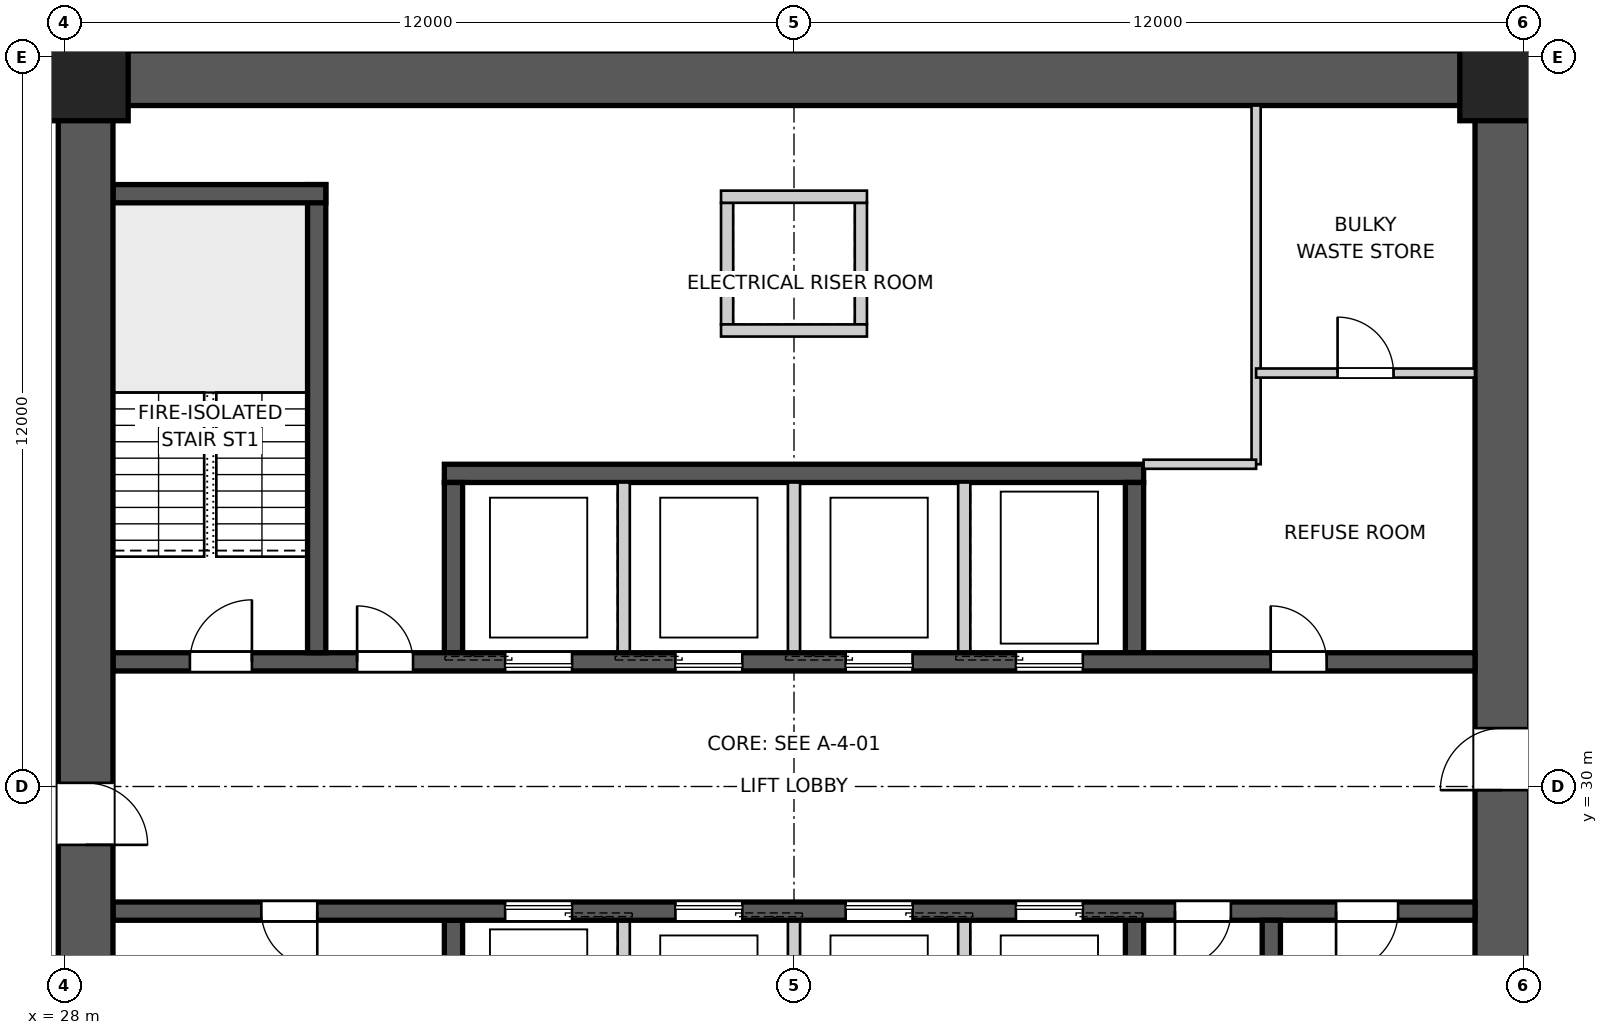
"""IFC4 building model, lengths in metres.
Left out: names, types, materials, properties, quantities, classifications, styles, units other than length and angle.
Written with IfcOpenShell. Run it as: python <this file> out.ifc"""

import sys

from ifc_helpers import new_model, si_unit, direction, frame, frame_2d, origin, origin_2d, place, context, subcontext, project, spatial, polyline, rectangle, outline, extrude, element, fill, save


model = new_model("IFC4")
c1 = context("Model", 3, precision=1e-05, world=origin(), true_north=direction((0.0, 1.0)))
c2 = subcontext(c1, "Body", "Model", "MODEL_VIEW")
j1 = project(units=[si_unit("LENGTHUNIT", "METRE"), si_unit("PLANEANGLEUNIT", "RADIAN")], contexts=[c1])
p1 = place(None, origin())
s1 = spatial("IfcSite", under=j1, at=p1, CompositionType="ELEMENT")
p2 = place(p1, origin())
s2 = spatial("IfcBuilding", under=s1, at=p2, CompositionType="ELEMENT")
p3 = place(p2, frame((0.0, 0.0, -3.7)))
s3 = spatial("IfcBuildingStorey", under=s2, at=p3, CompositionType="ELEMENT", Elevation=-3.7)
p4 = place(p3, frame((28.8, 41.65, 0.0), z_axis=(0.0, 0.0, 1.0), x_axis=(1.0, 0.0, 0.0)))
e1 = element("IfcWall", 1, at=p4, inside=s3, PredefinedType="SHEAR", context=c2, shape_type="SweptSolid", body=[
    extrude(outline(polyline([(0.0, -0.45), (22.4, -0.45), (22.4, -0.025), (22.85, -0.025), (22.85, 0.025), (22.4, 0.025), (22.4, 0.45), (0.0, 0.45), (0.0, 0.025), (-0.45, 0.025), (-0.45, -0.025), (0.0, -0.025), (0.0, -0.45)])), origin(), (0.0, 0.0, 1.0), 3.7),
])
p5 = place(p3, frame((51.65, 18.8, 0.0), z_axis=(0.0, 0.0, 1.0), x_axis=(0.0, 1.0, 0.0)))
e2 = element("IfcWall", 2, at=p5, inside=s3, PredefinedType="SHEAR", context=c2, shape_type="SweptSolid", body=[
    extrude(outline(polyline([(0.0, -0.45), (22.4, -0.45), (22.4, -0.025), (22.85, -0.025), (22.85, 0.025), (22.4, 0.025), (22.4, 0.45), (0.0, 0.45), (0.0, 0.025), (-0.45, 0.025), (-0.45, -0.025), (0.0, -0.025), (0.0, -0.45)])), origin(), (0.0, 0.0, 1.0), 3.7),
])
p6 = place(p5, frame((11.14, 0.0, 0.0)))
e3 = element("IfcOpeningElement", 3, at=p6, cuts=e2, PredefinedType="OPENING", context=c2, shape_type="SweptSolid", body=[
    extrude(rectangle(XDim=1.02, YDim=2.4, at=frame_2d((0.51, 1.2))), frame((0.0, 0.46, 0.0), z_axis=(0.0, -1.0, 0.0), x_axis=(1.0, 0.0, 0.0)), (0.0, 0.0, 1.0), 0.92),
])
p7 = place(p3, frame((28.35, 41.2, 0.0), z_axis=(0.0, 0.0, 1.0), x_axis=(0.0, -1.0, 0.0)))
e4 = element("IfcWall", 4, at=p7, inside=s3, PredefinedType="SHEAR", context=c2, shape_type="SweptSolid", body=[
    extrude(outline(polyline([(0.0, -0.45), (22.4, -0.45), (22.4, -0.025), (22.85, -0.025), (22.85, 0.025), (22.4, 0.025), (22.4, 0.45), (0.0, 0.45), (0.0, 0.025), (-0.45, 0.025), (-0.45, -0.025), (0.0, -0.025), (0.0, -0.45)])), origin(), (0.0, 0.0, 1.0), 3.7),
])
p8 = place(p7, frame((11.14, 0.0, 0.0)))
e5 = element("IfcOpeningElement", 5, at=p8, cuts=e4, PredefinedType="OPENING", context=c2, shape_type="SweptSolid", body=[
    extrude(rectangle(XDim=1.02, YDim=2.4, at=frame_2d((0.51, 1.2))), frame((0.0, 0.46, 0.0), z_axis=(0.0, -1.0, 0.0), x_axis=(1.0, 0.0, 0.0)), (0.0, 0.0, 1.0), 0.92),
])
p9 = place(p3, frame((28.8, 32.05, 0.0), z_axis=(0.0, 0.0, 1.0), x_axis=(1.0, 0.0, 0.0)))
e6 = element("IfcWall", 6, at=p9, inside=s3, PredefinedType="SHEAR", context=c2, shape_type="SweptSolid", body=[
    extrude(rectangle(XDim=22.4, YDim=0.3, at=frame_2d((11.2, 0.0))), origin(), (0.0, 0.0, 1.0), 3.7),
])
p10 = place(p9, frame((19.04, 0.0, 0.0)))
e7 = element("IfcOpeningElement", 7, at=p10, cuts=e6, PredefinedType="OPENING", context=c2, shape_type="SweptSolid", body=[
    extrude(rectangle(XDim=0.92, YDim=2.1, at=frame_2d((0.46, 1.05))), frame((0.0, 0.16, 0.0), z_axis=(0.0, -1.0, 0.0), x_axis=(1.0, 0.0, 0.0)), (0.0, 0.0, 1.0), 0.32),
])
p11 = place(p9, frame((1.265, 0.0, 0.0)))
e8 = element("IfcOpeningElement", 8, at=p11, cuts=e6, PredefinedType="OPENING", context=c2, shape_type="SweptSolid", body=[
    extrude(rectangle(XDim=1.02, YDim=2.1, at=frame_2d((0.51, 1.05))), frame((0.0, 0.16, 0.0), z_axis=(0.0, -1.0, 0.0), x_axis=(1.0, 0.0, 0.0)), (0.0, 0.0, 1.0), 0.32),
])
p12 = place(p9, frame((4.015, 0.0, 0.0)))
e9 = element("IfcOpeningElement", 9, at=p12, cuts=e6, PredefinedType="OPENING", context=c2, shape_type="SweptSolid", body=[
    extrude(rectangle(XDim=0.92, YDim=2.1, at=frame_2d((0.46, 1.05))), frame((0.0, 0.16, 0.0), z_axis=(0.0, -1.0, 0.0), x_axis=(1.0, 0.0, 0.0)), (0.0, 0.0, 1.0), 0.32),
])
p13 = place(p9, frame((6.45, 0.0, 0.0)))
e10 = element("IfcOpeningElement", 10, at=p13, cuts=e6, PredefinedType="OPENING", context=c2, shape_type="SweptSolid", body=[
    extrude(rectangle(XDim=1.1, YDim=2.1, at=frame_2d((0.55, 1.05))), frame((0.0, 0.16, 0.0), z_axis=(0.0, -1.0, 0.0), x_axis=(1.0, 0.0, 0.0)), (0.0, 0.0, 1.0), 0.32),
])
p14 = place(p9, frame((9.25, 0.0, 0.0)))
e11 = element("IfcOpeningElement", 11, at=p14, cuts=e6, PredefinedType="OPENING", context=c2, shape_type="SweptSolid", body=[
    extrude(rectangle(XDim=1.1, YDim=2.1, at=frame_2d((0.55, 1.05))), frame((0.0, 0.16, 0.0), z_axis=(0.0, -1.0, 0.0), x_axis=(1.0, 0.0, 0.0)), (0.0, 0.0, 1.0), 0.32),
])
p15 = place(p9, frame((12.05, 0.0, 0.0)))
e12 = element("IfcOpeningElement", 12, at=p15, cuts=e6, PredefinedType="OPENING", context=c2, shape_type="SweptSolid", body=[
    extrude(rectangle(XDim=1.1, YDim=2.1, at=frame_2d((0.55, 1.05))), frame((0.0, 0.16, 0.0), z_axis=(0.0, -1.0, 0.0), x_axis=(1.0, 0.0, 0.0)), (0.0, 0.0, 1.0), 0.32),
])
p16 = place(p9, frame((14.85, 0.0, 0.0)))
e13 = element("IfcOpeningElement", 13, at=p16, cuts=e6, PredefinedType="OPENING", context=c2, shape_type="SweptSolid", body=[
    extrude(rectangle(XDim=1.1, YDim=2.1, at=frame_2d((0.55, 1.05))), frame((0.0, 0.16, 0.0), z_axis=(0.0, -1.0, 0.0), x_axis=(1.0, 0.0, 0.0)), (0.0, 0.0, 1.0), 0.32),
])
p17 = place(p3, frame((51.2, 27.95, 0.0), z_axis=(0.0, 0.0, 1.0), x_axis=(-1.0, 0.0, 0.0)))
e14 = element("IfcWall", 14, at=p17, inside=s3, PredefinedType="SHEAR", context=c2, shape_type="SweptSolid", body=[
    extrude(rectangle(XDim=22.4, YDim=0.3, at=frame_2d((11.2, 0.0))), origin(), (0.0, 0.0, 1.0), 3.7),
])
p18 = place(p17, frame((19.04, 0.0, 0.0)))
e15 = element("IfcOpeningElement", 15, at=p18, cuts=e14, PredefinedType="OPENING", context=c2, shape_type="SweptSolid", body=[
    extrude(rectangle(XDim=0.92, YDim=2.1, at=frame_2d((0.46, 1.05))), frame((0.0, 0.16, 0.0), z_axis=(0.0, -1.0, 0.0), x_axis=(1.0, 0.0, 0.0)), (0.0, 0.0, 1.0), 0.32),
])
p19 = place(p17, frame((1.265, 0.0, 0.0)))
e16 = element("IfcOpeningElement", 16, at=p19, cuts=e14, PredefinedType="OPENING", context=c2, shape_type="SweptSolid", body=[
    extrude(rectangle(XDim=1.02, YDim=2.1, at=frame_2d((0.51, 1.05))), frame((0.0, 0.16, 0.0), z_axis=(0.0, -1.0, 0.0), x_axis=(1.0, 0.0, 0.0)), (0.0, 0.0, 1.0), 0.32),
])
p20 = place(p17, frame((4.015, 0.0, 0.0)))
e17 = element("IfcOpeningElement", 17, at=p20, cuts=e14, PredefinedType="OPENING", context=c2, shape_type="SweptSolid", body=[
    extrude(rectangle(XDim=0.92, YDim=2.1, at=frame_2d((0.46, 1.05))), frame((0.0, 0.16, 0.0), z_axis=(0.0, -1.0, 0.0), x_axis=(1.0, 0.0, 0.0)), (0.0, 0.0, 1.0), 0.32),
])
p21 = place(p17, frame((6.45, 0.0, 0.0)))
e18 = element("IfcOpeningElement", 18, at=p21, cuts=e14, PredefinedType="OPENING", context=c2, shape_type="SweptSolid", body=[
    extrude(rectangle(XDim=1.1, YDim=2.1, at=frame_2d((0.55, 1.05))), frame((0.0, 0.16, 0.0), z_axis=(0.0, -1.0, 0.0), x_axis=(1.0, 0.0, 0.0)), (0.0, 0.0, 1.0), 0.32),
])
p22 = place(p17, frame((9.25, 0.0, 0.0)))
e19 = element("IfcOpeningElement", 19, at=p22, cuts=e14, PredefinedType="OPENING", context=c2, shape_type="SweptSolid", body=[
    extrude(rectangle(XDim=1.1, YDim=2.1, at=frame_2d((0.55, 1.05))), frame((0.0, 0.16, 0.0), z_axis=(0.0, -1.0, 0.0), x_axis=(1.0, 0.0, 0.0)), (0.0, 0.0, 1.0), 0.32),
])
p23 = place(p17, frame((12.05, 0.0, 0.0)))
e20 = element("IfcOpeningElement", 20, at=p23, cuts=e14, PredefinedType="OPENING", context=c2, shape_type="SweptSolid", body=[
    extrude(rectangle(XDim=1.1, YDim=2.1, at=frame_2d((0.55, 1.05))), frame((0.0, 0.16, 0.0), z_axis=(0.0, -1.0, 0.0), x_axis=(1.0, 0.0, 0.0)), (0.0, 0.0, 1.0), 0.32),
])
p24 = place(p17, frame((14.85, 0.0, 0.0)))
e21 = element("IfcOpeningElement", 21, at=p24, cuts=e14, PredefinedType="OPENING", context=c2, shape_type="SweptSolid", body=[
    extrude(rectangle(XDim=1.1, YDim=2.1, at=frame_2d((0.55, 1.05))), frame((0.0, 0.16, 0.0), z_axis=(0.0, -1.0, 0.0), x_axis=(1.0, 0.0, 0.0)), (0.0, 0.0, 1.0), 0.32),
])
p25 = place(p3, frame((34.25, 35.15, 0.0), z_axis=(0.0, 0.0, 1.0), x_axis=(1.0, 0.0, 0.0)))
e22 = element("IfcWall", 22, at=p25, inside=s3, PredefinedType="SHEAR", context=c2, shape_type="SweptSolid", body=[
    extrude(rectangle(XDim=11.5, YDim=0.3, at=frame_2d((5.75, 0.0))), origin(), (0.0, 0.0, 1.0), 3.7),
])
for number, where, z_axis, x_axis in (
    (23, (34.4, 32.2, 0.0), (0.0, 0.0, 1.0), (0.0, 1.0, 0.0)),
    (24, (45.6, 27.8, 0.0), (0.0, 0.0, 1.0), (0.0, -1.0, 0.0)),
):
    element("IfcWall", number, at=place(p3, frame(where, z_axis=z_axis, x_axis=x_axis)), inside=s3, PredefinedType="SHEAR", context=c2, shape_type="SweptSolid", body=[
        extrude(rectangle(XDim=2.8, YDim=0.3, at=frame_2d((1.4, 0.0))), origin(), (0.0, 0.0, 1.0), 3.7),
    ])
for number, where, z_axis, x_axis in (
    (25, (37.2, 32.2, 0.0), (0.0, 0.0, 1.0), (0.0, 1.0, 0.0)),
    (26, (42.8, 27.8, 0.0), (0.0, 0.0, 1.0), (0.0, -1.0, 0.0)),
    (27, (40.0, 32.2, 0.0), (0.0, 0.0, 1.0), (0.0, 1.0, 0.0)),
    (28, (40.0, 27.8, 0.0), (0.0, 0.0, 1.0), (0.0, -1.0, 0.0)),
    (29, (42.8, 32.2, 0.0), (0.0, 0.0, 1.0), (0.0, 1.0, 0.0)),
    (30, (37.2, 27.8, 0.0), (0.0, 0.0, 1.0), (0.0, -1.0, 0.0)),
):
    element("IfcWall", number, at=place(p3, frame(where, z_axis=z_axis, x_axis=x_axis)), inside=s3, PredefinedType="SOLIDWALL", context=c2, shape_type="SweptSolid", body=[
        extrude(rectangle(XDim=2.8, YDim=0.2, at=frame_2d((1.4, 0.0))), origin(), (0.0, 0.0, 1.0), 3.7),
    ])
for number, where, z_axis, x_axis in (
    (31, (45.6, 32.2, 0.0), (0.0, 0.0, 1.0), (0.0, 1.0, 0.0)),
    (32, (34.4, 27.8, 0.0), (0.0, 0.0, 1.0), (0.0, -1.0, 0.0)),
):
    element("IfcWall", number, at=place(p3, frame(where, z_axis=z_axis, x_axis=x_axis)), inside=s3, PredefinedType="SHEAR", context=c2, shape_type="SweptSolid", body=[
        extrude(rectangle(XDim=2.8, YDim=0.3, at=frame_2d((1.4, 0.0))), origin(), (0.0, 0.0, 1.0), 3.7),
    ])
p26 = place(p3, frame((32.15, 32.2, 0.0), z_axis=(0.0, 0.0, 1.0), x_axis=(0.0, 1.0, 0.0)))
e33 = element("IfcWall", 33, at=p26, inside=s3, PredefinedType="SHEAR", context=c2, shape_type="SweptSolid", body=[
    extrude(rectangle(XDim=7.7, YDim=0.3, at=frame_2d((3.85, 0.0))), origin(), (0.0, 0.0, 1.0), 3.7),
])
p27 = place(p3, frame((28.8, 39.75, 0.0), z_axis=(0.0, 0.0, 1.0), x_axis=(1.0, 0.0, 0.0)))
e34 = element("IfcWall", 34, at=p27, inside=s3, PredefinedType="SHEAR", context=c2, shape_type="SweptSolid", body=[
    extrude(rectangle(XDim=3.5, YDim=0.3, at=frame_2d((1.75, 0.0))), origin(), (0.0, 0.0, 1.0), 3.7),
])
p28 = place(p3, frame((47.85, 27.8, 0.0), z_axis=(0.0, 0.0, 1.0), x_axis=(0.0, -1.0, 0.0)))
e35 = element("IfcWall", 35, at=p28, inside=s3, PredefinedType="SHEAR", context=c2, shape_type="SweptSolid", body=[
    extrude(rectangle(XDim=7.7, YDim=0.3, at=frame_2d((3.85, 0.0))), origin(), (0.0, 0.0, 1.0), 3.7),
])
for number, where, z_axis, x_axis in (
    (36, (38.9, 37.6, 0.0), (0.0, 0.0, 1.0), (0.0, 1.0, 0.0)),
    (37, (41.1, 37.6, 0.0), (0.0, 0.0, 1.0), (0.0, 1.0, 0.0)),
):
    element("IfcWall", number, at=place(p3, frame(where, z_axis=z_axis, x_axis=x_axis)), inside=s3, PredefinedType="SOLIDWALL", context=c2, shape_type="SweptSolid", body=[
        extrude(rectangle(XDim=2.0, YDim=0.2, at=frame_2d((1.0, 0.0))), origin(), (0.0, 0.0, 1.0), 3.7),
    ])
for number, where, z_axis, x_axis in (
    (38, (38.8, 37.5, 0.0), (0.0, 0.0, 1.0), (1.0, 0.0, 0.0)),
    (39, (38.8, 39.7, 0.0), (0.0, 0.0, 1.0), (1.0, 0.0, 0.0)),
):
    element("IfcWall", number, at=place(p3, frame(where, z_axis=z_axis, x_axis=x_axis)), inside=s3, PredefinedType="SOLIDWALL", context=c2, shape_type="SweptSolid", body=[
        extrude(rectangle(XDim=2.4, YDim=0.2, at=frame_2d((1.2, 0.0))), origin(), (0.0, 0.0, 1.0), 3.7),
    ])
for number, where, z_axis, x_axis in (
    (40, (51.65, 41.65, 0.0), (0.0, 0.0, 1.0), (1.0, 0.0, 0.0)),
    (41, (28.35, 41.65, 0.0), (0.0, 0.0, 1.0), (1.0, 0.0, 0.0)),
):
    element("IfcColumn", number, at=place(p3, frame(where, z_axis=z_axis, x_axis=x_axis)), inside=s3, PredefinedType="COLUMN", context=c2, shape_type="SweptSolid", body=[
        extrude(rectangle(XDim=1.4, YDim=1.4, at=origin_2d()), origin(), (0.0, 0.0, 1.0), 3.7),
    ])
p29 = place(p3, frame((47.6, 41.2, 0.0), z_axis=(0.0, 0.0, 1.0), x_axis=(0.0, -1.0, 0.0)))
e42 = element("IfcWall", 42, at=p29, inside=s3, PredefinedType="SOLIDWALL", context=c2, shape_type="SweptSolid", body=[
    extrude(rectangle(XDim=5.9, YDim=0.15, at=frame_2d((2.95, 0.0))), origin(), (0.0, 0.0, 1.0), 3.35),
])
p30 = place(p3, frame((47.6, 35.3, 0.0), z_axis=(0.0, 0.0, 1.0), x_axis=(-1.0, 0.0, 0.0)))
e43 = element("IfcWall", 43, at=p30, inside=s3, PredefinedType="SOLIDWALL", context=c2, shape_type="SweptSolid", body=[
    extrude(rectangle(XDim=1.85, YDim=0.15, at=frame_2d((0.925, 0.0))), origin(), (0.0, 0.0, 1.0), 3.35),
])
p31 = place(p3, frame((47.6, 36.8, 0.0), z_axis=(0.0, 0.0, 1.0), x_axis=(1.0, 0.0, 0.0)))
e44 = element("IfcWall", 44, at=p31, inside=s3, PredefinedType="SOLIDWALL", context=c2, shape_type="SweptSolid", body=[
    extrude(rectangle(XDim=3.6, YDim=0.15, at=frame_2d((1.8, 0.0))), origin(), (0.0, 0.0, 1.0), 3.35),
])
p32 = place(p31, frame((1.34, 0.0, 0.0)))
e45 = element("IfcOpeningElement", 45, at=p32, cuts=e44, PredefinedType="OPENING", context=c2, shape_type="SweptSolid", body=[
    extrude(rectangle(XDim=0.92, YDim=2.1, at=frame_2d((0.46, 1.05))), frame((0.0, 0.085, 0.0), z_axis=(0.0, -1.0, 0.0), x_axis=(1.0, 0.0, 0.0)), (0.0, 0.0, 1.0), 0.17),
])
p33 = place(p10, origin())
e46 = element("IfcDoor", 46, at=p33, inside=s3, OperationType="SINGLE_SWING_LEFT", PredefinedType="DOOR", context=c2, shape_type="SweptSolid", body=[
    extrude(rectangle(XDim=0.92, YDim=2.1, at=frame_2d((0.46, 1.05))), frame((0.0, 0.025, 0.0), z_axis=(0.0, -1.0, 0.0), x_axis=(1.0, 0.0, 0.0)), (0.0, 0.0, 1.0), 0.05),
])
fill(e7, e46)
p34 = place(p18, origin())
e47 = element("IfcDoor", 47, at=p34, inside=s3, OperationType="SINGLE_SWING_LEFT", PredefinedType="DOOR", context=c2, shape_type="SweptSolid", body=[
    extrude(rectangle(XDim=0.92, YDim=2.1, at=frame_2d((0.46, 1.05))), frame((0.0, 0.025, 0.0), z_axis=(0.0, -1.0, 0.0), x_axis=(1.0, 0.0, 0.0)), (0.0, 0.0, 1.0), 0.05),
])
fill(e15, e47)
p35 = place(p19, origin())
e48 = element("IfcDoor", 48, at=p35, inside=s3, OperationType="SINGLE_SWING_RIGHT", PredefinedType="DOOR", context=c2, shape_type="SweptSolid", body=[
    extrude(rectangle(XDim=1.02, YDim=2.1, at=frame_2d((0.51, 1.05))), frame((0.0, 0.025, 0.0), z_axis=(0.0, -1.0, 0.0), x_axis=(1.0, 0.0, 0.0)), (0.0, 0.0, 1.0), 0.05),
])
fill(e16, e48)
p36 = place(p11, origin())
e49 = element("IfcDoor", 49, at=p36, inside=s3, OperationType="SINGLE_SWING_RIGHT", PredefinedType="DOOR", context=c2, shape_type="SweptSolid", body=[
    extrude(rectangle(XDim=1.02, YDim=2.1, at=frame_2d((0.51, 1.05))), frame((0.0, 0.025, 0.0), z_axis=(0.0, -1.0, 0.0), x_axis=(1.0, 0.0, 0.0)), (0.0, 0.0, 1.0), 0.05),
])
fill(e8, e49)
p37 = place(p12, origin())
e50 = element("IfcDoor", 50, at=p37, inside=s3, OperationType="SINGLE_SWING_LEFT", PredefinedType="DOOR", context=c2, shape_type="SweptSolid", body=[
    extrude(rectangle(XDim=0.92, YDim=2.1, at=frame_2d((0.46, 1.05))), frame((0.0, 0.025, 0.0), z_axis=(0.0, -1.0, 0.0), x_axis=(1.0, 0.0, 0.0)), (0.0, 0.0, 1.0), 0.05),
])
fill(e9, e50)
p38 = place(p20, origin())
e51 = element("IfcDoor", 51, at=p38, inside=s3, OperationType="SINGLE_SWING_RIGHT", PredefinedType="DOOR", context=c2, shape_type="SweptSolid", body=[
    extrude(rectangle(XDim=0.92, YDim=2.1, at=frame_2d((0.46, 1.05))), frame((0.0, 0.025, 0.0), z_axis=(0.0, -1.0, 0.0), x_axis=(1.0, 0.0, 0.0)), (0.0, 0.0, 1.0), 0.05),
])
fill(e17, e51)
p39 = place(p32, origin())
e52 = element("IfcDoor", 52, at=p39, inside=s3, OperationType="SINGLE_SWING_LEFT", PredefinedType="DOOR", context=c2, shape_type="SweptSolid", body=[
    extrude(rectangle(XDim=0.92, YDim=2.1, at=frame_2d((0.46, 1.05))), frame((0.0, 0.025, 0.0), z_axis=(0.0, -1.0, 0.0), x_axis=(1.0, 0.0, 0.0)), (0.0, 0.0, 1.0), 0.05),
])
fill(e45, e52)
p40 = place(p6, origin())
e53 = element("IfcDoor", 53, at=p40, inside=s3, OperationType="SINGLE_SWING_LEFT", PredefinedType="DOOR", context=c2, shape_type="SweptSolid", body=[
    extrude(rectangle(XDim=1.02, YDim=2.4, at=frame_2d((0.51, 1.2))), frame((0.0, 0.025, 0.0), z_axis=(0.0, -1.0, 0.0), x_axis=(1.0, 0.0, 0.0)), (0.0, 0.0, 1.0), 0.05),
])
fill(e3, e53)
p41 = place(p8, origin())
e54 = element("IfcDoor", 54, at=p41, inside=s3, OperationType="SINGLE_SWING_RIGHT", PredefinedType="DOOR", context=c2, shape_type="SweptSolid", body=[
    extrude(rectangle(XDim=1.02, YDim=2.4, at=frame_2d((0.51, 1.2))), frame((0.0, 0.025, 0.0), z_axis=(0.0, -1.0, 0.0), x_axis=(1.0, 0.0, 0.0)), (0.0, 0.0, 1.0), 0.05),
])
fill(e5, e54)
p42 = place(p13, origin())
e55 = element("IfcDoor", 55, at=p42, inside=s3, OperationType="SLIDING_TO_LEFT", PredefinedType="DOOR", context=c2, shape_type="SweptSolid", body=[
    extrude(rectangle(XDim=1.1, YDim=2.1, at=frame_2d((0.55, 1.05))), frame((0.0, 0.025, 0.0), z_axis=(0.0, -1.0, 0.0), x_axis=(1.0, 0.0, 0.0)), (0.0, 0.0, 1.0), 0.05),
])
fill(e10, e55)
p43 = place(p21, origin())
e56 = element("IfcDoor", 56, at=p43, inside=s3, OperationType="SLIDING_TO_LEFT", PredefinedType="DOOR", context=c2, shape_type="SweptSolid", body=[
    extrude(rectangle(XDim=1.1, YDim=2.1, at=frame_2d((0.55, 1.05))), frame((0.0, 0.025, 0.0), z_axis=(0.0, -1.0, 0.0), x_axis=(1.0, 0.0, 0.0)), (0.0, 0.0, 1.0), 0.05),
])
fill(e18, e56)
p44 = place(p14, origin())
e57 = element("IfcDoor", 57, at=p44, inside=s3, OperationType="SLIDING_TO_LEFT", PredefinedType="DOOR", context=c2, shape_type="SweptSolid", body=[
    extrude(rectangle(XDim=1.1, YDim=2.1, at=frame_2d((0.55, 1.05))), frame((0.0, 0.025, 0.0), z_axis=(0.0, -1.0, 0.0), x_axis=(1.0, 0.0, 0.0)), (0.0, 0.0, 1.0), 0.05),
])
fill(e11, e57)
p45 = place(p22, origin())
e58 = element("IfcDoor", 58, at=p45, inside=s3, OperationType="SLIDING_TO_LEFT", PredefinedType="DOOR", context=c2, shape_type="SweptSolid", body=[
    extrude(rectangle(XDim=1.1, YDim=2.1, at=frame_2d((0.55, 1.05))), frame((0.0, 0.025, 0.0), z_axis=(0.0, -1.0, 0.0), x_axis=(1.0, 0.0, 0.0)), (0.0, 0.0, 1.0), 0.05),
])
fill(e19, e58)
p46 = place(p15, origin())
e59 = element("IfcDoor", 59, at=p46, inside=s3, OperationType="SLIDING_TO_LEFT", PredefinedType="DOOR", context=c2, shape_type="SweptSolid", body=[
    extrude(rectangle(XDim=1.1, YDim=2.1, at=frame_2d((0.55, 1.05))), frame((0.0, 0.025, 0.0), z_axis=(0.0, -1.0, 0.0), x_axis=(1.0, 0.0, 0.0)), (0.0, 0.0, 1.0), 0.05),
])
fill(e12, e59)
p47 = place(p23, origin())
e60 = element("IfcDoor", 60, at=p47, inside=s3, OperationType="SLIDING_TO_LEFT", PredefinedType="DOOR", context=c2, shape_type="SweptSolid", body=[
    extrude(rectangle(XDim=1.1, YDim=2.1, at=frame_2d((0.55, 1.05))), frame((0.0, 0.025, 0.0), z_axis=(0.0, -1.0, 0.0), x_axis=(1.0, 0.0, 0.0)), (0.0, 0.0, 1.0), 0.05),
])
fill(e20, e60)
p48 = place(p16, origin())
e61 = element("IfcDoor", 61, at=p48, inside=s3, OperationType="SLIDING_TO_LEFT", PredefinedType="DOOR", context=c2, shape_type="SweptSolid", body=[
    extrude(rectangle(XDim=1.1, YDim=2.1, at=frame_2d((0.55, 1.05))), frame((0.0, 0.025, 0.0), z_axis=(0.0, -1.0, 0.0), x_axis=(1.0, 0.0, 0.0)), (0.0, 0.0, 1.0), 0.05),
])
fill(e13, e61)
p49 = place(p24, origin())
e62 = element("IfcDoor", 62, at=p49, inside=s3, OperationType="SLIDING_TO_LEFT", PredefinedType="DOOR", context=c2, shape_type="SweptSolid", body=[
    extrude(rectangle(XDim=1.1, YDim=2.1, at=frame_2d((0.55, 1.05))), frame((0.0, 0.025, 0.0), z_axis=(0.0, -1.0, 0.0), x_axis=(1.0, 0.0, 0.0)), (0.0, 0.0, 1.0), 0.05),
])
fill(e21, e62)
save(model, sys.argv[1])
